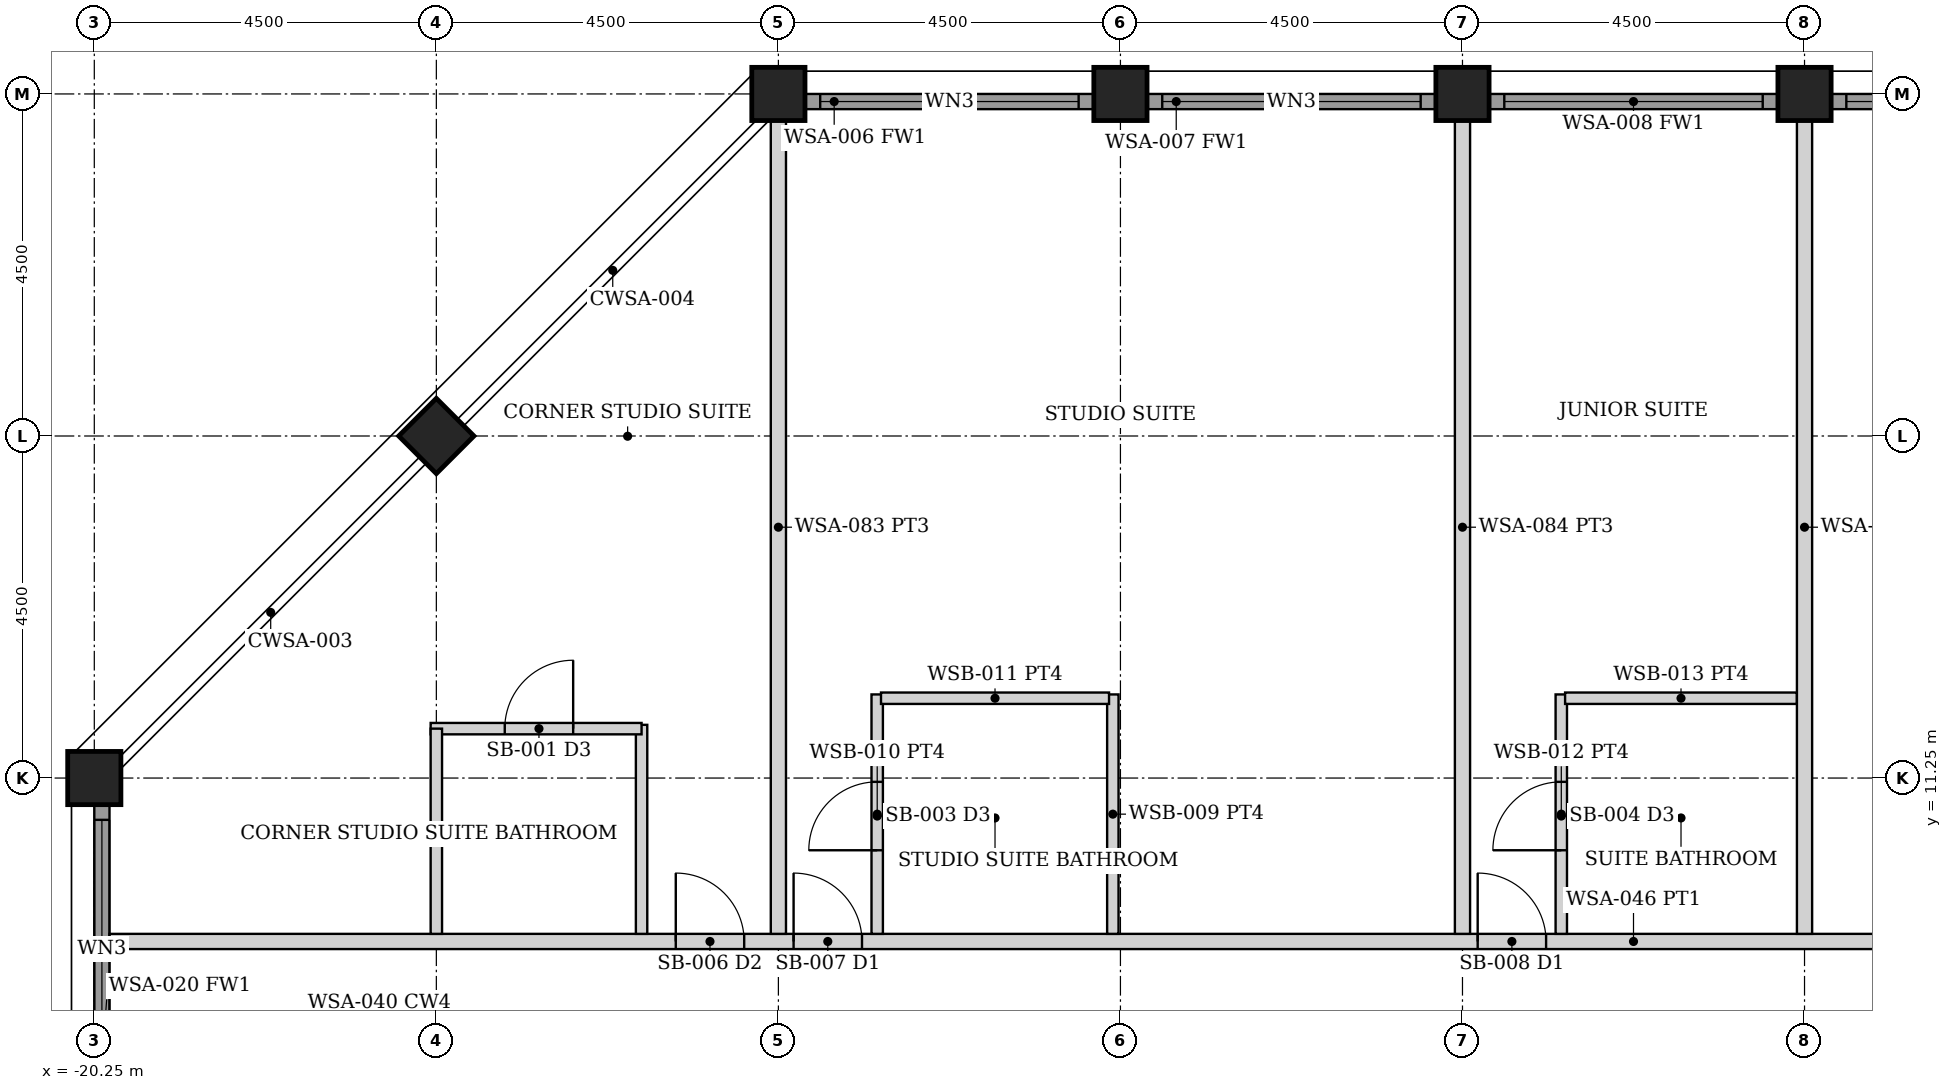
"""IFC4 building model, lengths in metres.
Left out: names, types, materials, properties, quantities, classifications, styles, units other than length and angle.
Written with IfcOpenShell. Run it as: python <this file> out.ifc"""

import sys

from ifc_helpers import new_model, si_unit, direction, frame, frame_2d, origin, origin_2d, place, context, subcontext, project, spatial, rectangle, hollow_rectangle, extrude, element, fill, save


model = new_model("IFC4")
c1 = context("Model", 3, precision=1e-05, world=origin(), true_north=direction((0.0, 1.0)))
c2 = subcontext(c1, "Body", "Model", "MODEL_VIEW")
j1 = project(units=[si_unit("LENGTHUNIT", "METRE"), si_unit("PLANEANGLEUNIT", "RADIAN")], contexts=[c1])
p1 = place(None, origin())
s1 = spatial("IfcSite", under=j1, at=p1, CompositionType="ELEMENT")
p2 = place(p1, origin())
s2 = spatial("IfcBuilding", under=s1, at=p2, CompositionType="ELEMENT")
p3 = place(p2, frame((0.0, 0.0, 212.05)))
s3 = spatial("IfcBuildingStorey", under=s2, at=p3, CompositionType="ELEMENT", Elevation=212.05)
for number, where, z_axis, x_axis in (
    (1, (-11.25, 20.25, 0.0), (0.0, 0.0, 1.0), (0.0, 1.0, 0.0)),
    (2, (-6.75, 20.25, 0.0), (0.0, 0.0, 1.0), (0.0, 1.0, 0.0)),
    (3, (-2.25, 20.25, 0.0), (0.0, 0.0, 1.0), (0.0, 1.0, 0.0)),
    (4, (2.25, 20.25, 0.0), (0.0, 0.0, 1.0), (0.0, 1.0, 0.0)),
    (5, (-20.25, 11.25, 0.0), (0.0, 0.0, 1.0), (1.0, 0.0, 0.0)),
    (6, (-15.75, 15.75, 0.0), (0.0, 0.0, 1.0), (0.707, -0.707, 0.0)),
):
    element("IfcColumn", number, at=place(p3, frame(where, z_axis=z_axis, x_axis=x_axis)), inside=s3, PredefinedType="COLUMN", context=c2, shape_type="SweptSolid", body=[
        extrude(hollow_rectangle(XDim=0.7, YDim=0.7, WallThickness=0.045, at=origin_2d()), origin(), (0.0, 0.0, 1.0), 3.75),
    ])
p4 = place(p3, frame((-10.895, 20.15, 0.0), z_axis=(0.0, 0.0, 1.0), x_axis=(1.0, 0.0, 0.0)))
e7 = element("IfcWall", 7, at=p4, inside=s3, PredefinedType="SOLIDWALL", context=c2, shape_type="SweptSolid", body=[
    extrude(rectangle(XDim=3.79, YDim=0.2, at=frame_2d((1.895, 0.0))), origin(), (0.0, 0.0, 1.0), 2.629),
])
p5 = place(p4, frame((0.195, 0.0, 0.3)))
e8 = element("IfcOpeningElement", 8, at=p5, cuts=e7, PredefinedType="OPENING", context=c2, shape_type="SweptSolid", body=[
    extrude(rectangle(XDim=3.4, YDim=2.179, at=frame_2d((1.7, 1.089))), frame((0.0, 0.11, 0.0), z_axis=(0.0, -1.0, 0.0), x_axis=(1.0, 0.0, 0.0)), (0.0, 0.0, 1.0), 0.22),
])
p6 = place(p3, frame((-6.395, 20.15, 0.0), z_axis=(0.0, 0.0, 1.0), x_axis=(1.0, 0.0, 0.0)))
e9 = element("IfcWall", 9, at=p6, inside=s3, PredefinedType="SOLIDWALL", context=c2, shape_type="SweptSolid", body=[
    extrude(rectangle(XDim=3.79, YDim=0.2, at=frame_2d((1.895, 0.0))), origin(), (0.0, 0.0, 1.0), 2.629),
])
p7 = place(p6, frame((0.195, 0.0, 0.3)))
e10 = element("IfcOpeningElement", 10, at=p7, cuts=e9, PredefinedType="OPENING", context=c2, shape_type="SweptSolid", body=[
    extrude(rectangle(XDim=3.4, YDim=2.179, at=frame_2d((1.7, 1.089))), frame((0.0, 0.11, 0.0), z_axis=(0.0, -1.0, 0.0), x_axis=(1.0, 0.0, 0.0)), (0.0, 0.0, 1.0), 0.22),
])
p8 = place(p3, frame((-1.895, 20.15, 0.0), z_axis=(0.0, 0.0, 1.0), x_axis=(1.0, 0.0, 0.0)))
e11 = element("IfcWall", 11, at=p8, inside=s3, PredefinedType="SOLIDWALL", context=c2, shape_type="SweptSolid", body=[
    extrude(rectangle(XDim=3.79, YDim=0.2, at=frame_2d((1.895, 0.0))), origin(), (0.0, 0.0, 1.0), 2.629),
])
p9 = place(p8, frame((0.195, 0.0, 0.3)))
e12 = element("IfcOpeningElement", 12, at=p9, cuts=e11, PredefinedType="OPENING", context=c2, shape_type="SweptSolid", body=[
    extrude(rectangle(XDim=3.4, YDim=2.179, at=frame_2d((1.7, 1.089))), frame((0.0, 0.11, 0.0), z_axis=(0.0, -1.0, 0.0), x_axis=(1.0, 0.0, 0.0)), (0.0, 0.0, 1.0), 0.22),
])
p10 = place(p3, frame((2.605, 20.15, 0.0), z_axis=(0.0, 0.0, 1.0), x_axis=(1.0, 0.0, 0.0)))
e13 = element("IfcWall", 13, at=p10, inside=s3, PredefinedType="SOLIDWALL", context=c2, shape_type="SweptSolid", body=[
    extrude(rectangle(XDim=3.79, YDim=0.2, at=frame_2d((1.895, 0.0))), origin(), (0.0, 0.0, 1.0), 2.629),
])
p11 = place(p10, frame((0.195, 0.0, 0.3)))
e14 = element("IfcOpeningElement", 14, at=p11, cuts=e13, PredefinedType="OPENING", context=c2, shape_type="SweptSolid", body=[
    extrude(rectangle(XDim=3.4, YDim=2.179, at=frame_2d((1.7, 1.089))), frame((0.0, 0.11, 0.0), z_axis=(0.0, -1.0, 0.0), x_axis=(1.0, 0.0, 0.0)), (0.0, 0.0, 1.0), 0.22),
])
p12 = place(p3, frame((-20.15, 7.105, 0.0), z_axis=(0.0, 0.0, 1.0), x_axis=(0.0, 1.0, 0.0)))
e15 = element("IfcWall", 15, at=p12, inside=s3, PredefinedType="SOLIDWALL", context=c2, shape_type="SweptSolid", body=[
    extrude(rectangle(XDim=3.79, YDim=0.2, at=frame_2d((1.895, 0.0))), origin(), (0.0, 0.0, 1.0), 2.629),
])
p13 = place(p12, frame((0.195, 0.0, 0.3)))
e16 = element("IfcOpeningElement", 16, at=p13, cuts=e15, PredefinedType="OPENING", context=c2, shape_type="SweptSolid", body=[
    extrude(rectangle(XDim=3.4, YDim=2.179, at=frame_2d((1.7, 1.089))), frame((0.0, 0.11, 0.0), z_axis=(0.0, -1.0, 0.0), x_axis=(1.0, 0.0, 0.0)), (0.0, 0.0, 1.0), 0.22),
])
p14 = place(p3, frame((-20.05, 9.1, 0.0), z_axis=(0.0, 0.0, 1.0), x_axis=(1.0, 0.0, 0.0)))
e17 = element("IfcWall", 17, at=p14, inside=s3, PredefinedType="PARTITIONING", context=c2, shape_type="SweptSolid", body=[
    extrude(rectangle(XDim=40.1, YDim=0.2, at=frame_2d((20.05, 0.0))), origin(), (0.0, 0.0, 1.0), 2.629),
])
p15 = place(p14, frame((9.0, 0.0, 0.0)))
e18 = element("IfcOpeningElement", 18, at=p15, cuts=e17, PredefinedType="OPENING", context=c2, shape_type="SweptSolid", body=[
    extrude(rectangle(XDim=0.9, YDim=2.1, at=frame_2d((0.45, 1.05))), frame((0.0, 0.11, 0.0), z_axis=(0.0, -1.0, 0.0), x_axis=(1.0, 0.0, 0.0)), (0.0, 0.0, 1.0), 0.22),
])
p16 = place(p14, frame((18.0, 0.0, 0.0)))
e19 = element("IfcOpeningElement", 19, at=p16, cuts=e17, PredefinedType="OPENING", context=c2, shape_type="SweptSolid", body=[
    extrude(rectangle(XDim=0.9, YDim=2.1, at=frame_2d((0.45, 1.05))), frame((0.0, 0.11, 0.0), z_axis=(0.0, -1.0, 0.0), x_axis=(1.0, 0.0, 0.0)), (0.0, 0.0, 1.0), 0.22),
])
p17 = place(p14, frame((30.2, 0.0, 0.0)))
e20 = element("IfcOpeningElement", 20, at=p17, cuts=e17, PredefinedType="OPENING", context=c2, shape_type="SweptSolid", body=[
    extrude(rectangle(XDim=0.9, YDim=2.1, at=frame_2d((0.45, 1.05))), frame((0.0, 0.11, 0.0), z_axis=(0.0, -1.0, 0.0), x_axis=(1.0, 0.0, 0.0)), (0.0, 0.0, 1.0), 0.22),
])
p18 = place(p14, frame((31.75, 0.0, 0.0)))
e21 = element("IfcOpeningElement", 21, at=p18, cuts=e17, PredefinedType="OPENING", context=c2, shape_type="SweptSolid", body=[
    extrude(rectangle(XDim=0.9, YDim=2.1, at=frame_2d((0.45, 1.05))), frame((0.0, 0.11, 0.0), z_axis=(0.0, -1.0, 0.0), x_axis=(1.0, 0.0, 0.0)), (0.0, 0.0, 1.0), 0.22),
])
p19 = place(p14, frame((7.45, 0.0, 0.0)))
e22 = element("IfcOpeningElement", 22, at=p19, cuts=e17, PredefinedType="OPENING", context=c2, shape_type="SweptSolid", body=[
    extrude(rectangle(XDim=0.9, YDim=2.1, at=frame_2d((0.45, 1.05))), frame((0.0, 0.11, 0.0), z_axis=(0.0, -1.0, 0.0), x_axis=(1.0, 0.0, 0.0)), (0.0, 0.0, 1.0), 0.22),
])
p20 = place(p3, frame((-9.95, 9.2, 0.0), z_axis=(0.0, 0.0, 1.0), x_axis=(0.0, 1.0, 0.0)))
e23 = element("IfcWall", 23, at=p20, inside=s3, PredefinedType="PARTITIONING", context=c2, shape_type="SweptSolid", body=[
    extrude(rectangle(XDim=3.15, YDim=0.15, at=frame_2d((1.575, 0.0))), origin(), (0.0, 0.0, 1.0), 2.629),
])
p21 = place(p20, frame((1.1, 0.0, 0.0)))
e24 = element("IfcOpeningElement", 24, at=p21, cuts=e23, PredefinedType="OPENING", context=c2, shape_type="SweptSolid", body=[
    extrude(rectangle(XDim=0.9, YDim=2.1, at=frame_2d((0.45, 1.05))), frame((0.0, 0.085, 0.0), z_axis=(0.0, -1.0, 0.0), x_axis=(1.0, 0.0, 0.0)), (0.0, 0.0, 1.0), 0.17),
])
p22 = place(p3, frame((-6.85, 9.2, 0.0), z_axis=(0.0, 0.0, 1.0), x_axis=(0.0, 1.0, 0.0)))
e25 = element("IfcWall", 25, at=p22, inside=s3, PredefinedType="PARTITIONING", context=c2, shape_type="SweptSolid", body=[
    extrude(rectangle(XDim=3.15, YDim=0.15, at=frame_2d((1.575, 0.0))), origin(), (0.0, 0.0, 1.0), 2.629),
])
p23 = place(p3, frame((-9.9, 12.3, 0.0), z_axis=(0.0, 0.0, 1.0), x_axis=(1.0, 0.0, 0.0)))
e26 = element("IfcWall", 26, at=p23, inside=s3, PredefinedType="PARTITIONING", context=c2, shape_type="SweptSolid", body=[
    extrude(rectangle(XDim=3.0, YDim=0.15, at=frame_2d((1.5, 0.0))), origin(), (0.0, 0.0, 1.0), 2.629),
])
p24 = place(p3, frame((-0.95, 9.2, 0.0), z_axis=(0.0, 0.0, 1.0), x_axis=(0.0, 1.0, 0.0)))
e27 = element("IfcWall", 27, at=p24, inside=s3, PredefinedType="PARTITIONING", context=c2, shape_type="SweptSolid", body=[
    extrude(rectangle(XDim=3.15, YDim=0.15, at=frame_2d((1.575, 0.0))), origin(), (0.0, 0.0, 1.0), 2.629),
])
p25 = place(p24, frame((1.1, 0.0, 0.0)))
e28 = element("IfcOpeningElement", 28, at=p25, cuts=e27, PredefinedType="OPENING", context=c2, shape_type="SweptSolid", body=[
    extrude(rectangle(XDim=0.9, YDim=2.1, at=frame_2d((0.45, 1.05))), frame((0.0, 0.085, 0.0), z_axis=(0.0, -1.0, 0.0), x_axis=(1.0, 0.0, 0.0)), (0.0, 0.0, 1.0), 0.17),
])
p26 = place(p3, frame((-0.9, 12.3, 0.0), z_axis=(0.0, 0.0, 1.0), x_axis=(1.0, 0.0, 0.0)))
e29 = element("IfcWall", 29, at=p26, inside=s3, PredefinedType="PARTITIONING", context=c2, shape_type="SweptSolid", body=[
    extrude(rectangle(XDim=3.05, YDim=0.15, at=frame_2d((1.525, 0.0))), origin(), (0.0, 0.0, 1.0), 2.629),
])
for number, where, z_axis, x_axis in (
    (30, (-11.25, 9.2, 0.0), (0.0, 0.0, 1.0), (0.0, 1.0, 0.0)),
    (31, (-2.25, 9.2, 0.0), (0.0, 0.0, 1.0), (0.0, 1.0, 0.0)),
    (32, (2.25, 9.2, 0.0), (0.0, 0.0, 1.0), (0.0, 1.0, 0.0)),
):
    element("IfcWall", number, at=place(p3, frame(where, z_axis=z_axis, x_axis=x_axis)), inside=s3, PredefinedType="PARTITIONING", context=c2, shape_type="SweptSolid", body=[
        extrude(rectangle(XDim=10.7, YDim=0.2, at=frame_2d((5.35, 0.0))), origin(), (0.0, 0.0, 1.0), 2.629),
    ])
p27 = place(p3, frame((-13.05, 9.2, 0.0), z_axis=(0.0, 0.0, 1.0), x_axis=(0.0, 1.0, 0.0)))
e33 = element("IfcWall", 33, at=p27, inside=s3, PredefinedType="PARTITIONING", context=c2, shape_type="SweptSolid", body=[
    extrude(rectangle(XDim=2.75, YDim=0.15, at=frame_2d((1.375, 0.0))), origin(), (0.0, 0.0, 1.0), 2.629),
])
p28 = place(p3, frame((-15.825, 11.9, 0.0), z_axis=(0.0, 0.0, 1.0), x_axis=(1.0, 0.0, 0.0)))
e34 = element("IfcWall", 34, at=p28, inside=s3, PredefinedType="PARTITIONING", context=c2, shape_type="SweptSolid", body=[
    extrude(rectangle(XDim=2.775, YDim=0.15, at=frame_2d((1.387, 0.0))), origin(), (0.0, 0.0, 1.0), 2.629),
])
p29 = place(p28, frame((0.975, 0.0, 0.0)))
e35 = element("IfcOpeningElement", 35, at=p29, cuts=e34, PredefinedType="OPENING", context=c2, shape_type="SweptSolid", body=[
    extrude(rectangle(XDim=0.9, YDim=2.1, at=frame_2d((0.45, 1.05))), frame((0.0, 0.085, 0.0), z_axis=(0.0, -1.0, 0.0), x_axis=(1.0, 0.0, 0.0)), (0.0, 0.0, 1.0), 0.17),
])
p30 = place(p3, frame((-15.75, 9.2, 0.0), z_axis=(0.0, 0.0, 1.0), x_axis=(0.0, 1.0, 0.0)))
e36 = element("IfcWall", 36, at=p30, inside=s3, PredefinedType="PARTITIONING", context=c2, shape_type="SweptSolid", body=[
    extrude(rectangle(XDim=2.7, YDim=0.15, at=frame_2d((1.35, 0.0))), origin(), (0.0, 0.0, 1.0), 2.629),
])
p31 = place(p5, origin())
e37 = element("IfcWindow", 37, at=p31, inside=s3, PartitioningType="SINGLE_PANEL", PredefinedType="WINDOW", context=c2, shape_type="SweptSolid", body=[
    extrude(rectangle(XDim=3.4, YDim=2.179, at=frame_2d((1.7, 1.089))), frame((0.0, 0.03, 0.0), z_axis=(0.0, -1.0, 0.0), x_axis=(1.0, 0.0, 0.0)), (0.0, 0.0, 1.0), 0.06),
])
fill(e8, e37)
p32 = place(p7, origin())
e38 = element("IfcWindow", 38, at=p32, inside=s3, PartitioningType="SINGLE_PANEL", PredefinedType="WINDOW", context=c2, shape_type="SweptSolid", body=[
    extrude(rectangle(XDim=3.4, YDim=2.179, at=frame_2d((1.7, 1.089))), frame((0.0, 0.03, 0.0), z_axis=(0.0, -1.0, 0.0), x_axis=(1.0, 0.0, 0.0)), (0.0, 0.0, 1.0), 0.06),
])
fill(e10, e38)
p33 = place(p9, origin())
e39 = element("IfcWindow", 39, at=p33, inside=s3, PartitioningType="SINGLE_PANEL", PredefinedType="WINDOW", context=c2, shape_type="SweptSolid", body=[
    extrude(rectangle(XDim=3.4, YDim=2.179, at=frame_2d((1.7, 1.089))), frame((0.0, 0.03, 0.0), z_axis=(0.0, -1.0, 0.0), x_axis=(1.0, 0.0, 0.0)), (0.0, 0.0, 1.0), 0.06),
])
fill(e12, e39)
p34 = place(p11, origin())
e40 = element("IfcWindow", 40, at=p34, inside=s3, PartitioningType="SINGLE_PANEL", PredefinedType="WINDOW", context=c2, shape_type="SweptSolid", body=[
    extrude(rectangle(XDim=3.4, YDim=2.179, at=frame_2d((1.7, 1.089))), frame((0.0, 0.03, 0.0), z_axis=(0.0, -1.0, 0.0), x_axis=(1.0, 0.0, 0.0)), (0.0, 0.0, 1.0), 0.06),
])
fill(e14, e40)
p35 = place(p13, origin())
e41 = element("IfcWindow", 41, at=p35, inside=s3, PartitioningType="SINGLE_PANEL", PredefinedType="WINDOW", context=c2, shape_type="SweptSolid", body=[
    extrude(rectangle(XDim=3.4, YDim=2.179, at=frame_2d((1.7, 1.089))), frame((0.0, 0.03, 0.0), z_axis=(0.0, -1.0, 0.0), x_axis=(1.0, 0.0, 0.0)), (0.0, 0.0, 1.0), 0.06),
])
fill(e16, e41)
p36 = place(p15, origin())
e42 = element("IfcDoor", 42, at=p36, inside=s3, OperationType="SINGLE_SWING_LEFT", PredefinedType="DOOR", context=c2, shape_type="SweptSolid", body=[
    extrude(rectangle(XDim=0.9, YDim=2.1, at=frame_2d((0.45, 1.05))), frame((0.0, 0.025, 0.0), z_axis=(0.0, -1.0, 0.0), x_axis=(1.0, 0.0, 0.0)), (0.0, 0.0, 1.0), 0.05),
])
fill(e18, e42)
p37 = place(p21, origin())
e43 = element("IfcDoor", 43, at=p37, inside=s3, OperationType="SINGLE_SWING_LEFT", PredefinedType="DOOR", context=c2, shape_type="SweptSolid", body=[
    extrude(rectangle(XDim=0.9, YDim=2.1, at=frame_2d((0.45, 1.05))), frame((0.0, 0.025, 0.0), z_axis=(0.0, -1.0, 0.0), x_axis=(1.0, 0.0, 0.0)), (0.0, 0.0, 1.0), 0.05),
])
fill(e24, e43)
p38 = place(p16, origin())
e44 = element("IfcDoor", 44, at=p38, inside=s3, OperationType="SINGLE_SWING_LEFT", PredefinedType="DOOR", context=c2, shape_type="SweptSolid", body=[
    extrude(rectangle(XDim=0.9, YDim=2.1, at=frame_2d((0.45, 1.05))), frame((0.0, 0.025, 0.0), z_axis=(0.0, -1.0, 0.0), x_axis=(1.0, 0.0, 0.0)), (0.0, 0.0, 1.0), 0.05),
])
fill(e19, e44)
p39 = place(p25, origin())
e45 = element("IfcDoor", 45, at=p39, inside=s3, OperationType="SINGLE_SWING_LEFT", PredefinedType="DOOR", context=c2, shape_type="SweptSolid", body=[
    extrude(rectangle(XDim=0.9, YDim=2.1, at=frame_2d((0.45, 1.05))), frame((0.0, 0.025, 0.0), z_axis=(0.0, -1.0, 0.0), x_axis=(1.0, 0.0, 0.0)), (0.0, 0.0, 1.0), 0.05),
])
fill(e28, e45)
p40 = place(p19, origin())
e46 = element("IfcDoor", 46, at=p40, inside=s3, OperationType="SINGLE_SWING_LEFT", PredefinedType="DOOR", context=c2, shape_type="SweptSolid", body=[
    extrude(rectangle(XDim=0.9, YDim=2.1, at=frame_2d((0.45, 1.05))), frame((0.0, 0.025, 0.0), z_axis=(0.0, -1.0, 0.0), x_axis=(1.0, 0.0, 0.0)), (0.0, 0.0, 1.0), 0.05),
])
fill(e22, e46)
p41 = place(p29, origin())
e47 = element("IfcDoor", 47, at=p41, inside=s3, OperationType="SINGLE_SWING_RIGHT", PredefinedType="DOOR", context=c2, shape_type="SweptSolid", body=[
    extrude(rectangle(XDim=0.9, YDim=2.1, at=frame_2d((0.45, 1.05))), frame((0.0, 0.025, 0.0), z_axis=(0.0, -1.0, 0.0), x_axis=(1.0, 0.0, 0.0)), (0.0, 0.0, 1.0), 0.05),
])
fill(e35, e47)
save(model, sys.argv[1])
